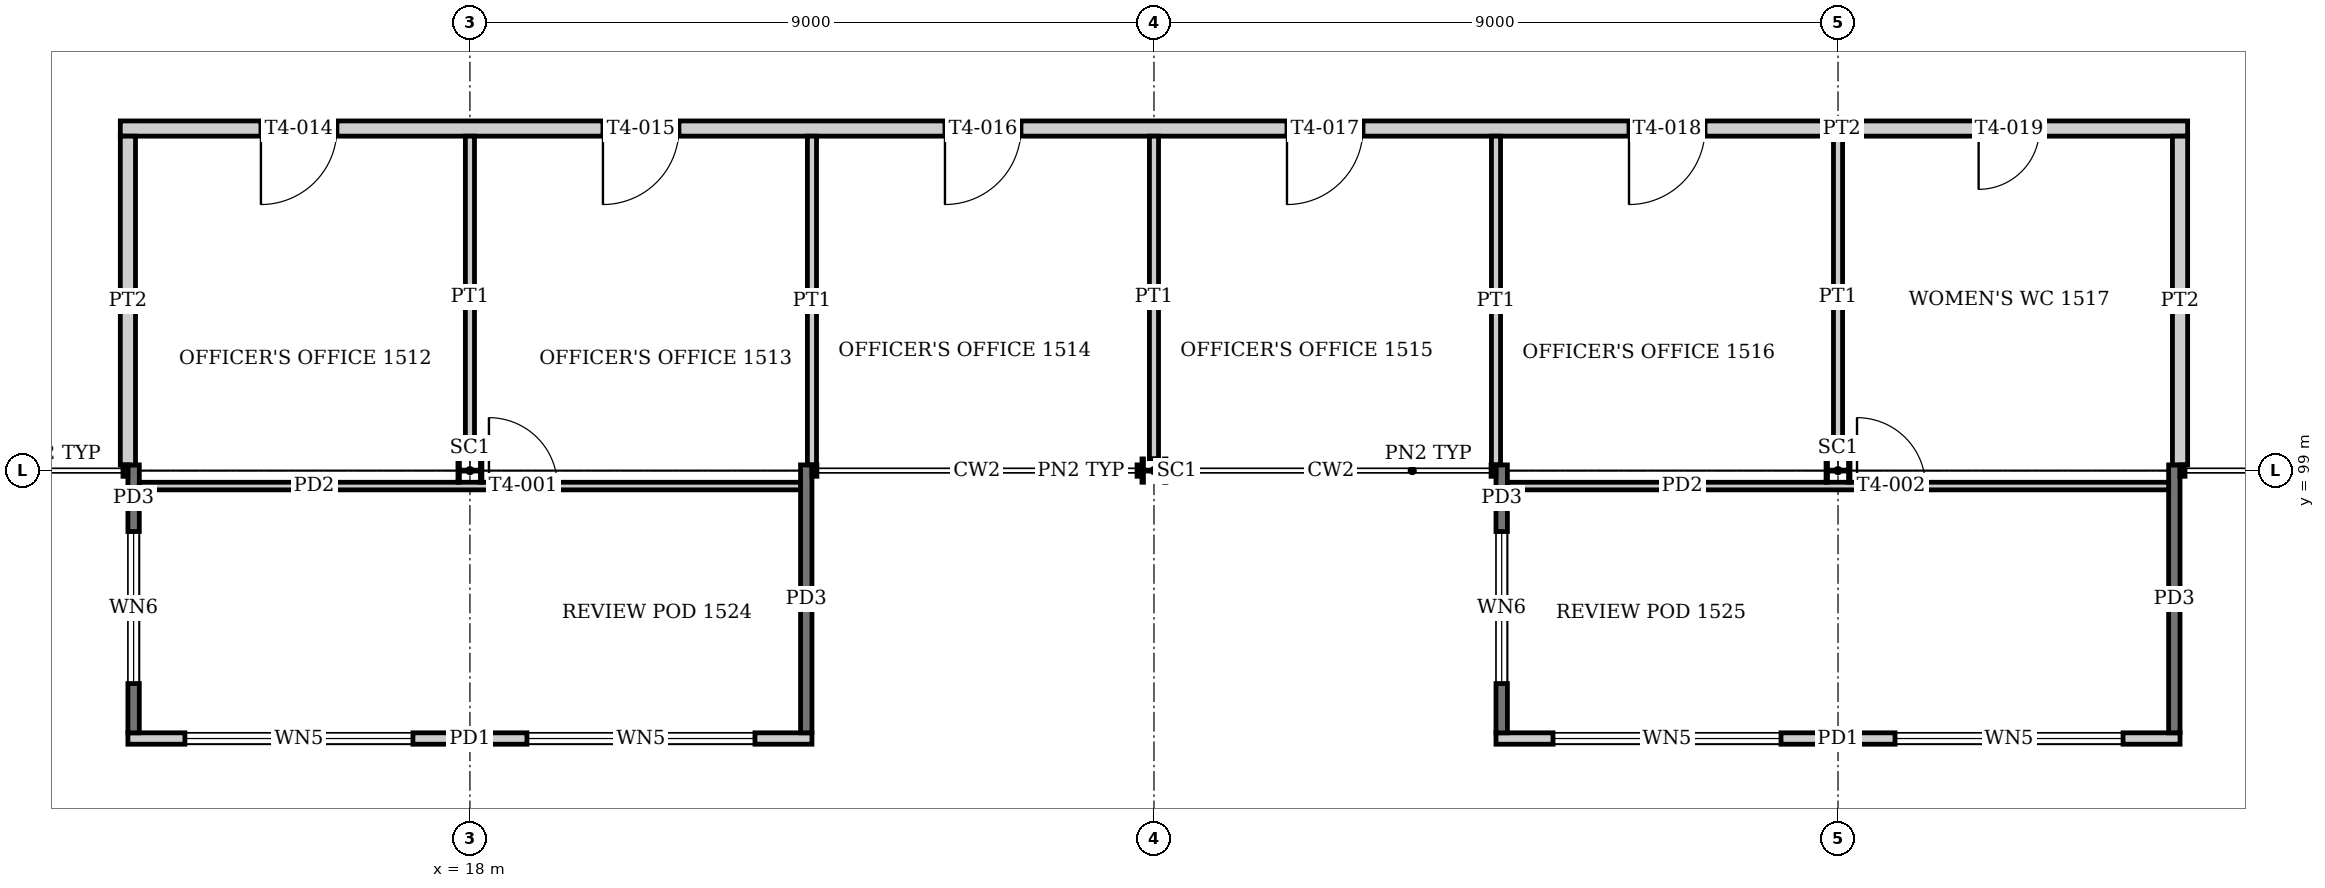
"""IFC4 building model, lengths in metres.
Left out: names, types, materials, properties, quantities, classifications, styles, units other than length and angle.
Written with IfcOpenShell. Run it as: python <this file> out.ifc"""

import sys

from ifc_helpers import new_model, si_unit, direction, frame, frame_2d, origin, origin_2d, place, context, subcontext, project, spatial, rectangle, i_section, extrude, element, fill, save


model = new_model("IFC4")
c1 = context("Model", 3, precision=1e-05, world=origin(), true_north=direction((0.0, 1.0)))
c2 = subcontext(c1, "Body", "Model", "MODEL_VIEW")
j1 = project(units=[si_unit("LENGTHUNIT", "METRE"), si_unit("PLANEANGLEUNIT", "RADIAN")], contexts=[c1])
p1 = place(None, origin())
s1 = spatial("IfcSite", under=j1, at=p1, CompositionType="ELEMENT")
p2 = place(p1, origin())
s2 = spatial("IfcBuilding", under=s1, at=p2, CompositionType="ELEMENT")
p3 = place(p2, frame((0.0, 0.0, 63.2)))
s3 = spatial("IfcBuildingStorey", under=s2, at=p3, CompositionType="ELEMENT", Elevation=63.2)
for number, where, z_axis, x_axis in (
    (1, (18.0, 99.0, 0.0), (0.0, 0.0, 1.0), (0.0, 1.0, 0.0)),
    (2, (27.0, 99.0, 0.0), (0.0, 0.0, 1.0), (0.0, 1.0, 0.0)),
    (3, (36.0, 99.0, 0.0), (0.0, 0.0, 1.0), (0.0, 1.0, 0.0)),
):
    element("IfcColumn", number, at=place(p3, frame(where, z_axis=z_axis, x_axis=x_axis)), inside=s3, PredefinedType="COLUMN", context=c2, shape_type="SweptSolid", body=[
        extrude(i_section(OverallWidth=0.307, OverallDepth=0.315, WebThickness=0.012, FlangeThickness=0.019, at=origin_2d()), origin(), (0.0, 0.0, 1.0), 4.0),
    ])
p4 = place(p3, frame((13.5, 95.475, 0.0), z_axis=(0.0, 0.0, 1.0), x_axis=(1.0, 0.0, 0.0)))
e4 = element("IfcWall", 4, at=p4, inside=s3, PredefinedType="SOLIDWALL", context=c2, shape_type="SweptSolid", body=[
    extrude(rectangle(XDim=9.0, YDim=0.15, at=frame_2d((4.5, 0.0))), origin(), (0.0, 0.0, 1.0), 2.6),
])
p5 = place(p4, frame((0.75, 0.0, 0.9)))
e5 = element("IfcOpeningElement", 5, at=p5, cuts=e4, PredefinedType="OPENING", context=c2, shape_type="SweptSolid", body=[
    extrude(rectangle(XDim=3.0, YDim=1.4, at=frame_2d((1.5, 0.7))), frame((0.0, 0.085, 0.0), z_axis=(0.0, -1.0, 0.0), x_axis=(1.0, 0.0, 0.0)), (0.0, 0.0, 1.0), 0.17),
])
p6 = place(p4, frame((5.25, 0.0, 0.9)))
e6 = element("IfcOpeningElement", 6, at=p6, cuts=e4, PredefinedType="OPENING", context=c2, shape_type="SweptSolid", body=[
    extrude(rectangle(XDim=3.0, YDim=1.4, at=frame_2d((1.5, 0.7))), frame((0.0, 0.085, 0.0), z_axis=(0.0, -1.0, 0.0), x_axis=(1.0, 0.0, 0.0)), (0.0, 0.0, 1.0), 0.17),
])
p7 = place(p3, frame((13.575, 95.55, -0.15), z_axis=(0.0, 0.0, 1.0), x_axis=(0.0, 1.0, 0.0)))
e7 = element("IfcWall", 7, at=p7, inside=s3, PredefinedType="SOLIDWALL", context=c2, shape_type="SweptSolid", body=[
    extrude(rectangle(XDim=3.525, YDim=0.15, at=frame_2d((1.762, 0.0))), origin(), (0.0, 0.0, 1.0), 2.75),
])
p8 = place(p7, frame((0.648, 0.0, 1.05)))
e8 = element("IfcOpeningElement", 8, at=p8, cuts=e7, PredefinedType="OPENING", context=c2, shape_type="SweptSolid", body=[
    extrude(rectangle(XDim=2.0, YDim=1.4, at=frame_2d((1.0, 0.7))), frame((0.0, 0.085, 0.0), z_axis=(0.0, -1.0, 0.0), x_axis=(1.0, 0.0, 0.0)), (0.0, 0.0, 1.0), 0.17),
])
p9 = place(p3, frame((22.425, 95.55, -0.15), z_axis=(0.0, 0.0, 1.0), x_axis=(0.0, 1.0, 0.0)))
e9 = element("IfcWall", 9, at=p9, inside=s3, PredefinedType="SOLIDWALL", context=c2, shape_type="SweptSolid", body=[
    extrude(rectangle(XDim=3.525, YDim=0.15, at=frame_2d((1.762, 0.0))), origin(), (0.0, 0.0, 1.0), 2.75),
])
p10 = place(p3, frame((13.65, 98.796, 0.0), z_axis=(0.0, 0.0, 1.0), x_axis=(1.0, 0.0, 0.0)))
e10 = element("IfcWall", 10, at=p10, inside=s3, PredefinedType="PARTITIONING", context=c2, shape_type="SweptSolid", body=[
    extrude(rectangle(XDim=8.7, YDim=0.1, at=frame_2d((4.35, 0.0))), origin(), (0.0, 0.0, 1.0), 2.6),
])
p11 = place(p10, frame((4.6, 0.0, 0.0)))
e11 = element("IfcOpeningElement", 11, at=p11, cuts=e10, PredefinedType="OPENING", context=c2, shape_type="SweptSolid", body=[
    extrude(rectangle(XDim=0.9, YDim=2.1, at=frame_2d((0.45, 1.05))), frame((0.0, 0.06, 0.0), z_axis=(0.0, -1.0, 0.0), x_axis=(1.0, 0.0, 0.0)), (0.0, 0.0, 1.0), 0.12),
])
p12 = place(p3, frame((31.5, 95.475, 0.0), z_axis=(0.0, 0.0, 1.0), x_axis=(1.0, 0.0, 0.0)))
e12 = element("IfcWall", 12, at=p12, inside=s3, PredefinedType="SOLIDWALL", context=c2, shape_type="SweptSolid", body=[
    extrude(rectangle(XDim=9.0, YDim=0.15, at=frame_2d((4.5, 0.0))), origin(), (0.0, 0.0, 1.0), 2.6),
])
p13 = place(p12, frame((0.75, 0.0, 0.9)))
e13 = element("IfcOpeningElement", 13, at=p13, cuts=e12, PredefinedType="OPENING", context=c2, shape_type="SweptSolid", body=[
    extrude(rectangle(XDim=3.0, YDim=1.4, at=frame_2d((1.5, 0.7))), frame((0.0, 0.085, 0.0), z_axis=(0.0, -1.0, 0.0), x_axis=(1.0, 0.0, 0.0)), (0.0, 0.0, 1.0), 0.17),
])
p14 = place(p12, frame((5.25, 0.0, 0.9)))
e14 = element("IfcOpeningElement", 14, at=p14, cuts=e12, PredefinedType="OPENING", context=c2, shape_type="SweptSolid", body=[
    extrude(rectangle(XDim=3.0, YDim=1.4, at=frame_2d((1.5, 0.7))), frame((0.0, 0.085, 0.0), z_axis=(0.0, -1.0, 0.0), x_axis=(1.0, 0.0, 0.0)), (0.0, 0.0, 1.0), 0.17),
])
p15 = place(p3, frame((31.575, 95.55, -0.15), z_axis=(0.0, 0.0, 1.0), x_axis=(0.0, 1.0, 0.0)))
e15 = element("IfcWall", 15, at=p15, inside=s3, PredefinedType="SOLIDWALL", context=c2, shape_type="SweptSolid", body=[
    extrude(rectangle(XDim=3.525, YDim=0.15, at=frame_2d((1.762, 0.0))), origin(), (0.0, 0.0, 1.0), 2.75),
])
p16 = place(p15, frame((0.648, 0.0, 1.05)))
e16 = element("IfcOpeningElement", 16, at=p16, cuts=e15, PredefinedType="OPENING", context=c2, shape_type="SweptSolid", body=[
    extrude(rectangle(XDim=2.0, YDim=1.4, at=frame_2d((1.0, 0.7))), frame((0.0, 0.085, 0.0), z_axis=(0.0, -1.0, 0.0), x_axis=(1.0, 0.0, 0.0)), (0.0, 0.0, 1.0), 0.17),
])
p17 = place(p3, frame((40.425, 95.55, -0.15), z_axis=(0.0, 0.0, 1.0), x_axis=(0.0, 1.0, 0.0)))
e17 = element("IfcWall", 17, at=p17, inside=s3, PredefinedType="SOLIDWALL", context=c2, shape_type="SweptSolid", body=[
    extrude(rectangle(XDim=3.525, YDim=0.15, at=frame_2d((1.762, 0.0))), origin(), (0.0, 0.0, 1.0), 2.75),
])
p18 = place(p3, frame((31.65, 98.796, 0.0), z_axis=(0.0, 0.0, 1.0), x_axis=(1.0, 0.0, 0.0)))
e18 = element("IfcWall", 18, at=p18, inside=s3, PredefinedType="PARTITIONING", context=c2, shape_type="SweptSolid", body=[
    extrude(rectangle(XDim=8.7, YDim=0.1, at=frame_2d((4.35, 0.0))), origin(), (0.0, 0.0, 1.0), 2.6),
])
p19 = place(p18, frame((4.6, 0.0, 0.0)))
e19 = element("IfcOpeningElement", 19, at=p19, cuts=e18, PredefinedType="OPENING", context=c2, shape_type="SweptSolid", body=[
    extrude(rectangle(XDim=0.9, YDim=2.1, at=frame_2d((0.45, 1.05))), frame((0.0, 0.06, 0.0), z_axis=(0.0, -1.0, 0.0), x_axis=(1.0, 0.0, 0.0)), (0.0, 0.0, 1.0), 0.12),
])
p20 = place(p3, frame((13.4, 103.5, 0.0), z_axis=(0.0, 0.0, 1.0), x_axis=(1.0, 0.0, 0.0)))
e20 = element("IfcWall", 20, at=p20, inside=s3, PredefinedType="PARTITIONING", context=c2, shape_type="SweptSolid", body=[
    extrude(rectangle(XDim=27.2, YDim=0.2, at=frame_2d((13.6, 0.0))), origin(), (0.0, 0.0, 1.0), 3.05),
])
p21 = place(p20, frame((1.85, 0.0, 0.0)))
e21 = element("IfcOpeningElement", 21, at=p21, cuts=e20, PredefinedType="OPENING", context=c2, shape_type="SweptSolid", body=[
    extrude(rectangle(XDim=1.0, YDim=2.1, at=frame_2d((0.5, 1.05))), frame((0.0, 0.11, 0.0), z_axis=(0.0, -1.0, 0.0), x_axis=(1.0, 0.0, 0.0)), (0.0, 0.0, 1.0), 0.22),
])
p22 = place(p20, frame((6.35, 0.0, 0.0)))
e22 = element("IfcOpeningElement", 22, at=p22, cuts=e20, PredefinedType="OPENING", context=c2, shape_type="SweptSolid", body=[
    extrude(rectangle(XDim=1.0, YDim=2.1, at=frame_2d((0.5, 1.05))), frame((0.0, 0.11, 0.0), z_axis=(0.0, -1.0, 0.0), x_axis=(1.0, 0.0, 0.0)), (0.0, 0.0, 1.0), 0.22),
])
p23 = place(p20, frame((10.85, 0.0, 0.0)))
e23 = element("IfcOpeningElement", 23, at=p23, cuts=e20, PredefinedType="OPENING", context=c2, shape_type="SweptSolid", body=[
    extrude(rectangle(XDim=1.0, YDim=2.1, at=frame_2d((0.5, 1.05))), frame((0.0, 0.11, 0.0), z_axis=(0.0, -1.0, 0.0), x_axis=(1.0, 0.0, 0.0)), (0.0, 0.0, 1.0), 0.22),
])
p24 = place(p20, frame((15.35, 0.0, 0.0)))
e24 = element("IfcOpeningElement", 24, at=p24, cuts=e20, PredefinedType="OPENING", context=c2, shape_type="SweptSolid", body=[
    extrude(rectangle(XDim=1.0, YDim=2.1, at=frame_2d((0.5, 1.05))), frame((0.0, 0.11, 0.0), z_axis=(0.0, -1.0, 0.0), x_axis=(1.0, 0.0, 0.0)), (0.0, 0.0, 1.0), 0.22),
])
p25 = place(p20, frame((19.85, 0.0, 0.0)))
e25 = element("IfcOpeningElement", 25, at=p25, cuts=e20, PredefinedType="OPENING", context=c2, shape_type="SweptSolid", body=[
    extrude(rectangle(XDim=1.0, YDim=2.1, at=frame_2d((0.5, 1.05))), frame((0.0, 0.11, 0.0), z_axis=(0.0, -1.0, 0.0), x_axis=(1.0, 0.0, 0.0)), (0.0, 0.0, 1.0), 0.22),
])
p26 = place(p20, frame((24.45, 0.0, 0.0)))
e26 = element("IfcOpeningElement", 26, at=p26, cuts=e20, PredefinedType="OPENING", context=c2, shape_type="SweptSolid", body=[
    extrude(rectangle(XDim=0.8, YDim=2.1, at=frame_2d((0.4, 1.05))), frame((0.0, 0.11, 0.0), z_axis=(0.0, -1.0, 0.0), x_axis=(1.0, 0.0, 0.0)), (0.0, 0.0, 1.0), 0.22),
])
p27 = place(p3, frame((13.5, 99.075, 0.0), z_axis=(0.0, 0.0, 1.0), x_axis=(0.0, 1.0, 0.0)))
e27 = element("IfcWall", 27, at=p27, inside=s3, PredefinedType="PARTITIONING", context=c2, shape_type="SweptSolid", body=[
    extrude(rectangle(XDim=4.325, YDim=0.2, at=frame_2d((2.163, 0.0))), origin(), (0.0, 0.0, 1.0), 3.05),
])
p28 = place(p3, frame((18.0, 99.157, 0.0), z_axis=(0.0, 0.0, 1.0), x_axis=(0.0, 1.0, 0.0)))
e28 = element("IfcWall", 28, at=p28, inside=s3, PredefinedType="PARTITIONING", context=c2, shape_type="SweptSolid", body=[
    extrude(rectangle(XDim=4.242, YDim=0.12, at=frame_2d((2.121, 0.0))), origin(), (0.0, 0.0, 1.0), 3.05),
])
p29 = place(p3, frame((22.5, 99.075, 0.0), z_axis=(0.0, 0.0, 1.0), x_axis=(0.0, 1.0, 0.0)))
e29 = element("IfcWall", 29, at=p29, inside=s3, PredefinedType="PARTITIONING", context=c2, shape_type="SweptSolid", body=[
    extrude(rectangle(XDim=4.325, YDim=0.12, at=frame_2d((2.163, 0.0))), origin(), (0.0, 0.0, 1.0), 3.05),
])
p30 = place(p3, frame((27.0, 99.157, 0.0), z_axis=(0.0, 0.0, 1.0), x_axis=(0.0, 1.0, 0.0)))
e30 = element("IfcWall", 30, at=p30, inside=s3, PredefinedType="PARTITIONING", context=c2, shape_type="SweptSolid", body=[
    extrude(rectangle(XDim=4.242, YDim=0.12, at=frame_2d((2.121, 0.0))), origin(), (0.0, 0.0, 1.0), 3.05),
])
p31 = place(p3, frame((31.5, 99.075, 0.0), z_axis=(0.0, 0.0, 1.0), x_axis=(0.0, 1.0, 0.0)))
e31 = element("IfcWall", 31, at=p31, inside=s3, PredefinedType="PARTITIONING", context=c2, shape_type="SweptSolid", body=[
    extrude(rectangle(XDim=4.325, YDim=0.12, at=frame_2d((2.163, 0.0))), origin(), (0.0, 0.0, 1.0), 3.05),
])
p32 = place(p3, frame((36.0, 99.157, 0.0), z_axis=(0.0, 0.0, 1.0), x_axis=(0.0, 1.0, 0.0)))
e32 = element("IfcWall", 32, at=p32, inside=s3, PredefinedType="PARTITIONING", context=c2, shape_type="SweptSolid", body=[
    extrude(rectangle(XDim=4.242, YDim=0.12, at=frame_2d((2.121, 0.0))), origin(), (0.0, 0.0, 1.0), 3.05),
])
p33 = place(p3, frame((40.5, 99.075, 0.0), z_axis=(0.0, 0.0, 1.0), x_axis=(0.0, 1.0, 0.0)))
e33 = element("IfcWall", 33, at=p33, inside=s3, PredefinedType="PARTITIONING", context=c2, shape_type="SweptSolid", body=[
    extrude(rectangle(XDim=4.325, YDim=0.2, at=frame_2d((2.163, 0.0))), origin(), (0.0, 0.0, 1.0), 3.05),
])
p34 = place(p5, origin())
e34 = element("IfcWindow", 34, at=p34, inside=s3, PartitioningType="SINGLE_PANEL", PredefinedType="WINDOW", context=c2, shape_type="SweptSolid", body=[
    extrude(rectangle(XDim=3.0, YDim=1.4, at=frame_2d((1.5, 0.7))), frame((0.0, 0.03, 0.0), z_axis=(0.0, -1.0, 0.0), x_axis=(1.0, 0.0, 0.0)), (0.0, 0.0, 1.0), 0.06),
])
fill(e5, e34)
p35 = place(p6, origin())
e35 = element("IfcWindow", 35, at=p35, inside=s3, PartitioningType="SINGLE_PANEL", PredefinedType="WINDOW", context=c2, shape_type="SweptSolid", body=[
    extrude(rectangle(XDim=3.0, YDim=1.4, at=frame_2d((1.5, 0.7))), frame((0.0, 0.03, 0.0), z_axis=(0.0, -1.0, 0.0), x_axis=(1.0, 0.0, 0.0)), (0.0, 0.0, 1.0), 0.06),
])
fill(e6, e35)
p36 = place(p8, origin())
e36 = element("IfcWindow", 36, at=p36, inside=s3, PartitioningType="SINGLE_PANEL", PredefinedType="WINDOW", context=c2, shape_type="SweptSolid", body=[
    extrude(rectangle(XDim=2.0, YDim=1.4, at=frame_2d((1.0, 0.7))), frame((0.0, 0.03, 0.0), z_axis=(0.0, -1.0, 0.0), x_axis=(1.0, 0.0, 0.0)), (0.0, 0.0, 1.0), 0.06),
])
fill(e8, e36)
p37 = place(p11, origin())
e37 = element("IfcDoor", 37, at=p37, inside=s3, OperationType="SINGLE_SWING_LEFT", PredefinedType="DOOR", context=c2, shape_type="SweptSolid", body=[
    extrude(rectangle(XDim=0.9, YDim=2.1, at=frame_2d((0.45, 1.05))), frame((0.0, 0.025, 0.0), z_axis=(0.0, -1.0, 0.0), x_axis=(1.0, 0.0, 0.0)), (0.0, 0.0, 1.0), 0.05),
])
fill(e11, e37)
p38 = place(p13, origin())
e38 = element("IfcWindow", 38, at=p38, inside=s3, PartitioningType="SINGLE_PANEL", PredefinedType="WINDOW", context=c2, shape_type="SweptSolid", body=[
    extrude(rectangle(XDim=3.0, YDim=1.4, at=frame_2d((1.5, 0.7))), frame((0.0, 0.03, 0.0), z_axis=(0.0, -1.0, 0.0), x_axis=(1.0, 0.0, 0.0)), (0.0, 0.0, 1.0), 0.06),
])
fill(e13, e38)
p39 = place(p14, origin())
e39 = element("IfcWindow", 39, at=p39, inside=s3, PartitioningType="SINGLE_PANEL", PredefinedType="WINDOW", context=c2, shape_type="SweptSolid", body=[
    extrude(rectangle(XDim=3.0, YDim=1.4, at=frame_2d((1.5, 0.7))), frame((0.0, 0.03, 0.0), z_axis=(0.0, -1.0, 0.0), x_axis=(1.0, 0.0, 0.0)), (0.0, 0.0, 1.0), 0.06),
])
fill(e14, e39)
p40 = place(p16, origin())
e40 = element("IfcWindow", 40, at=p40, inside=s3, PartitioningType="SINGLE_PANEL", PredefinedType="WINDOW", context=c2, shape_type="SweptSolid", body=[
    extrude(rectangle(XDim=2.0, YDim=1.4, at=frame_2d((1.0, 0.7))), frame((0.0, 0.03, 0.0), z_axis=(0.0, -1.0, 0.0), x_axis=(1.0, 0.0, 0.0)), (0.0, 0.0, 1.0), 0.06),
])
fill(e16, e40)
p41 = place(p19, origin())
e41 = element("IfcDoor", 41, at=p41, inside=s3, OperationType="SINGLE_SWING_LEFT", PredefinedType="DOOR", context=c2, shape_type="SweptSolid", body=[
    extrude(rectangle(XDim=0.9, YDim=2.1, at=frame_2d((0.45, 1.05))), frame((0.0, 0.025, 0.0), z_axis=(0.0, -1.0, 0.0), x_axis=(1.0, 0.0, 0.0)), (0.0, 0.0, 1.0), 0.05),
])
fill(e19, e41)
p42 = place(p21, frame((1.0, 0.0, 0.0), z_axis=(0.0, 0.0, 1.0), x_axis=(-1.0, 0.0, 0.0)))
e42 = element("IfcDoor", 42, at=p42, inside=s3, OperationType="SINGLE_SWING_RIGHT", PredefinedType="DOOR", context=c2, shape_type="SweptSolid", body=[
    extrude(rectangle(XDim=1.0, YDim=2.1, at=frame_2d((0.5, 1.05))), frame((0.0, 0.025, 0.0), z_axis=(0.0, -1.0, 0.0), x_axis=(1.0, 0.0, 0.0)), (0.0, 0.0, 1.0), 0.05),
])
fill(e21, e42)
p43 = place(p22, frame((1.0, 0.0, 0.0), z_axis=(0.0, 0.0, 1.0), x_axis=(-1.0, 0.0, 0.0)))
e43 = element("IfcDoor", 43, at=p43, inside=s3, OperationType="SINGLE_SWING_RIGHT", PredefinedType="DOOR", context=c2, shape_type="SweptSolid", body=[
    extrude(rectangle(XDim=1.0, YDim=2.1, at=frame_2d((0.5, 1.05))), frame((0.0, 0.025, 0.0), z_axis=(0.0, -1.0, 0.0), x_axis=(1.0, 0.0, 0.0)), (0.0, 0.0, 1.0), 0.05),
])
fill(e22, e43)
p44 = place(p23, frame((1.0, 0.0, 0.0), z_axis=(0.0, 0.0, 1.0), x_axis=(-1.0, 0.0, 0.0)))
e44 = element("IfcDoor", 44, at=p44, inside=s3, OperationType="SINGLE_SWING_RIGHT", PredefinedType="DOOR", context=c2, shape_type="SweptSolid", body=[
    extrude(rectangle(XDim=1.0, YDim=2.1, at=frame_2d((0.5, 1.05))), frame((0.0, 0.025, 0.0), z_axis=(0.0, -1.0, 0.0), x_axis=(1.0, 0.0, 0.0)), (0.0, 0.0, 1.0), 0.05),
])
fill(e23, e44)
p45 = place(p24, frame((1.0, 0.0, 0.0), z_axis=(0.0, 0.0, 1.0), x_axis=(-1.0, 0.0, 0.0)))
e45 = element("IfcDoor", 45, at=p45, inside=s3, OperationType="SINGLE_SWING_RIGHT", PredefinedType="DOOR", context=c2, shape_type="SweptSolid", body=[
    extrude(rectangle(XDim=1.0, YDim=2.1, at=frame_2d((0.5, 1.05))), frame((0.0, 0.025, 0.0), z_axis=(0.0, -1.0, 0.0), x_axis=(1.0, 0.0, 0.0)), (0.0, 0.0, 1.0), 0.05),
])
fill(e24, e45)
p46 = place(p25, frame((1.0, 0.0, 0.0), z_axis=(0.0, 0.0, 1.0), x_axis=(-1.0, 0.0, 0.0)))
e46 = element("IfcDoor", 46, at=p46, inside=s3, OperationType="SINGLE_SWING_RIGHT", PredefinedType="DOOR", context=c2, shape_type="SweptSolid", body=[
    extrude(rectangle(XDim=1.0, YDim=2.1, at=frame_2d((0.5, 1.05))), frame((0.0, 0.025, 0.0), z_axis=(0.0, -1.0, 0.0), x_axis=(1.0, 0.0, 0.0)), (0.0, 0.0, 1.0), 0.05),
])
fill(e25, e46)
p47 = place(p26, frame((0.8, 0.0, 0.0), z_axis=(0.0, 0.0, 1.0), x_axis=(-1.0, 0.0, 0.0)))
e47 = element("IfcDoor", 47, at=p47, inside=s3, OperationType="SINGLE_SWING_RIGHT", PredefinedType="DOOR", context=c2, shape_type="SweptSolid", body=[
    extrude(rectangle(XDim=0.8, YDim=2.1, at=frame_2d((0.4, 1.05))), frame((0.0, 0.025, 0.0), z_axis=(0.0, -1.0, 0.0), x_axis=(1.0, 0.0, 0.0)), (0.0, 0.0, 1.0), 0.05),
])
fill(e26, e47)
save(model, sys.argv[1])
